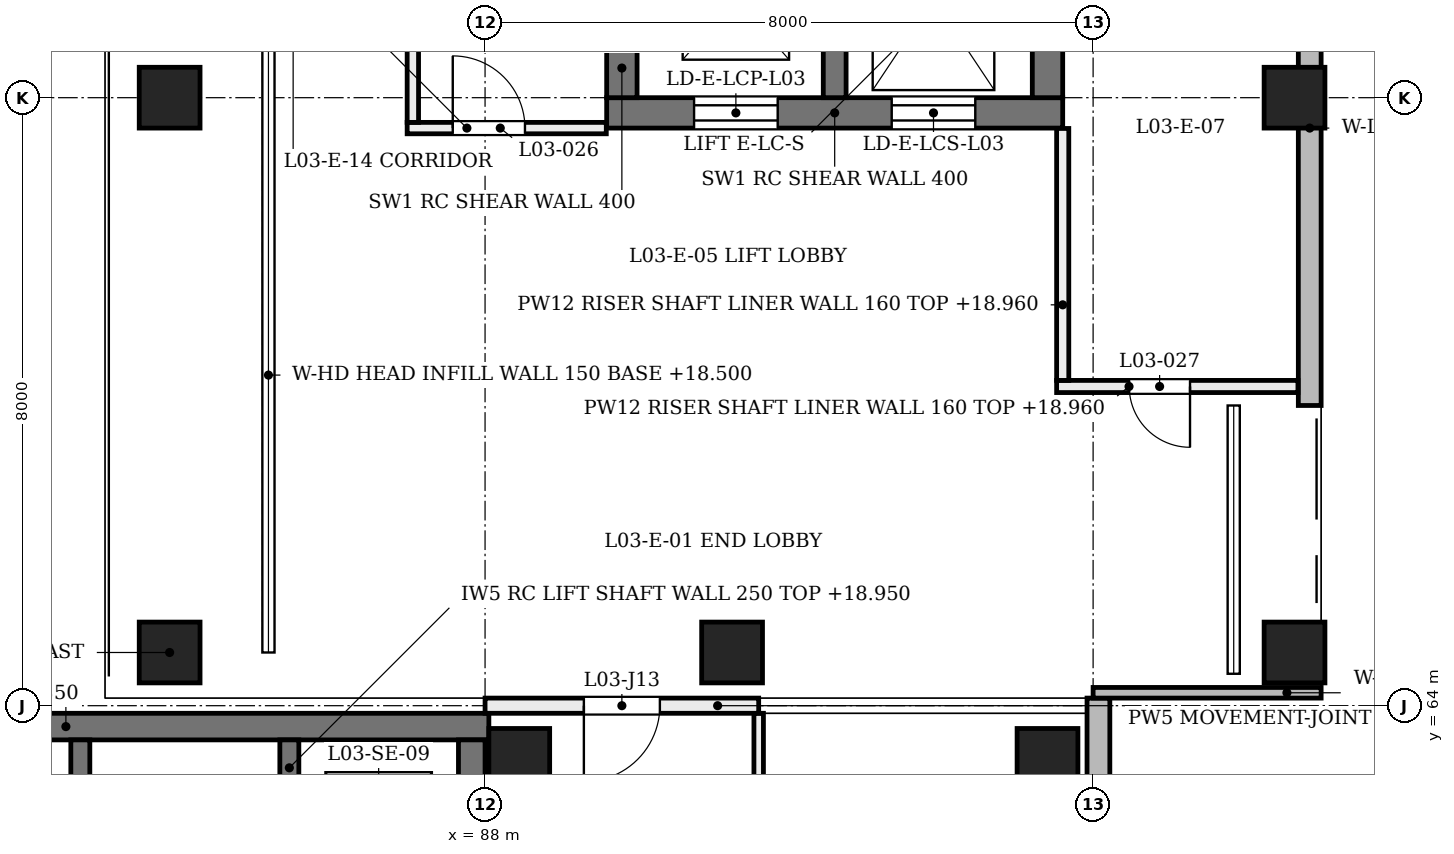
"""IFC4 building model, lengths in metres.
Left out: names, types, materials, properties, quantities, classifications, styles, units other than length and angle.
Written with IfcOpenShell. Run it as: python <this file> out.ifc"""

import sys

from ifc_helpers import new_model, si_unit, direction, frame, frame_2d, origin, origin_2d, place, context, subcontext, project, spatial, rectangle, extrude, element, fill, save


model = new_model("IFC4")
c1 = context("Model", 3, precision=1e-05, world=origin(), true_north=direction((0.0, 1.0)))
c2 = subcontext(c1, "Body", "Model", "MODEL_VIEW")
j1 = project(units=[si_unit("LENGTHUNIT", "METRE"), si_unit("PLANEANGLEUNIT", "RADIAN")], contexts=[c1])
p1 = place(None, origin())
s1 = spatial("IfcSite", under=j1, at=p1, CompositionType="ELEMENT")
p2 = place(p1, origin())
s2 = spatial("IfcBuilding", under=s1, at=p2, CompositionType="ELEMENT")
p3 = place(p2, frame((0.0, 0.0, 14.4)))
s3 = spatial("IfcBuildingStorey", under=s2, at=p3, CompositionType="ELEMENT", Elevation=14.4)
p4 = place(p3, frame((89.6, 71.8, 0.0), z_axis=(0.0, 0.0, 1.0), x_axis=(1.0, 0.0, 0.0)))
e1 = element("IfcWall", 1, at=p4, inside=s3, PredefinedType="SHEAR", context=c2, shape_type="SweptSolid", body=[
    extrude(rectangle(XDim=6.0, YDim=0.4, at=frame_2d((3.0, 0.0))), origin(), (0.0, 0.0, 1.0), 4.58),
])
p5 = place(p4, frame((1.15, 0.0, 0.0)))
e2 = element("IfcOpeningElement", 2, at=p5, cuts=e1, PredefinedType="OPENING", context=c2, shape_type="SweptSolid", body=[
    extrude(rectangle(XDim=1.1, YDim=2.1, at=frame_2d((0.55, 1.05))), frame((0.0, 0.21, 0.0), z_axis=(0.0, -1.0, 0.0), x_axis=(1.0, 0.0, 0.0)), (0.0, 0.0, 1.0), 0.42),
])
p6 = place(p4, frame((3.75, 0.0, 0.0)))
e3 = element("IfcOpeningElement", 3, at=p6, cuts=e1, PredefinedType="OPENING", context=c2, shape_type="SweptSolid", body=[
    extrude(rectangle(XDim=1.1, YDim=2.1, at=frame_2d((0.55, 1.05))), frame((0.0, 0.21, 0.0), z_axis=(0.0, -1.0, 0.0), x_axis=(1.0, 0.0, 0.0)), (0.0, 0.0, 1.0), 0.42),
])
for number, where, z_axis, x_axis in (
    (4, (89.8, 72.0, 0.0), (0.0, 0.0, 1.0), (0.0, 1.0, 0.0)),
    (5, (95.4, 72.0, 0.0), (0.0, 0.0, 1.0), (0.0, 1.0, 0.0)),
):
    element("IfcWall", number, at=place(p3, frame(where, z_axis=z_axis, x_axis=x_axis)), inside=s3, PredefinedType="SHEAR", context=c2, shape_type="SweptSolid", body=[
        extrude(rectangle(XDim=2.6, YDim=0.4, at=frame_2d((1.3, 0.0))), origin(), (0.0, 0.0, 1.0), 4.58),
    ])
p7 = place(p3, frame((92.6, 72.0, 0.0), z_axis=(0.0, 0.0, 1.0), x_axis=(0.0, 1.0, 0.0)))
e6 = element("IfcWall", 6, at=p7, inside=s3, PredefinedType="SHEAR", context=c2, shape_type="SweptSolid", body=[
    extrude(rectangle(XDim=2.6, YDim=0.3, at=frame_2d((1.3, 0.0))), origin(), (0.0, 0.0, 1.0), 4.58),
])
p8 = place(p3, frame((80.1, 63.725, 0.0), z_axis=(0.0, 0.0, 1.0), x_axis=(1.0, 0.0, 0.0)))
e7 = element("IfcWall", 7, at=p8, inside=s3, PredefinedType="SHEAR", context=c2, shape_type="SweptSolid", body=[
    extrude(rectangle(XDim=7.95, YDim=0.35, at=frame_2d((3.975, 0.0))), origin(), (0.0, 0.0, 1.0), 4.58),
])
p9 = place(p3, frame((87.825, 48.35, 0.0), z_axis=(0.0, 0.0, 1.0), x_axis=(0.0, 1.0, 0.0)))
e8 = element("IfcWall", 8, at=p9, inside=s3, PredefinedType="SHEAR", context=c2, shape_type="SweptSolid", body=[
    extrude(rectangle(XDim=15.2, YDim=0.35, at=frame_2d((7.6, 0.0))), origin(), (0.0, 0.0, 1.0), 4.58),
])
p10 = place(p9, frame((0.95, 0.0, 0.0)))
e9 = element("IfcOpeningElement", 9, at=p10, cuts=e8, PredefinedType="OPENING", context=c2, shape_type="SweptSolid", body=[
    extrude(rectangle(XDim=1.0, YDim=2.1, at=frame_2d((0.5, 1.05))), frame((0.0, 0.185, 0.0), z_axis=(0.0, -1.0, 0.0), x_axis=(1.0, 0.0, 0.0)), (0.0, 0.0, 1.0), 0.37),
])
p11 = place(p9, frame((10.6, 0.0, 0.0)))
e10 = element("IfcOpeningElement", 10, at=p11, cuts=e8, PredefinedType="OPENING", context=c2, shape_type="SweptSolid", body=[
    extrude(rectangle(XDim=1.4, YDim=2.1, at=frame_2d((0.7, 1.05))), frame((0.0, 0.185, 0.0), z_axis=(0.0, -1.0, 0.0), x_axis=(1.0, 0.0, 0.0)), (0.0, 0.0, 1.0), 0.37),
])
for number, where, z_axis, x_axis in (
    (11, (88.45, 63.3, 0.0), (0.0, 0.0, 1.0), (1.0, 0.0, 0.0)),
    (12, (95.4, 63.3, 0.0), (0.0, 0.0, 1.0), (1.0, 0.0, 0.0)),
):
    element("IfcColumn", number, at=place(p3, frame(where, z_axis=z_axis, x_axis=x_axis)), inside=s3, PredefinedType="COLUMN", context=c2, shape_type="SweptSolid", body=[
        extrude(rectangle(XDim=0.8, YDim=0.8, at=origin_2d()), origin(), (0.0, 0.0, 1.0), 4.8),
    ])
for number, where, z_axis, x_axis in (
    (13, (83.6, 64.7, 0.0), (0.204, 0.0, 0.979), (0.0, 1.0, 0.0)),
    (14, (83.6, 72.0, 0.0), (0.204, 0.0, 0.979), (0.0, 1.0, 0.0)),
    (15, (91.0, 64.7, 0.0), (0.204, 0.0, 0.979), (0.0, 1.0, 0.0)),
    (16, (98.4, 64.7, 0.0), (0.204, 0.0, 0.979), (0.0, 1.0, 0.0)),
    (17, (98.4, 72.0, 0.0), (0.204, 0.0, 0.979), (0.0, 1.0, 0.0)),
):
    element("IfcColumn", number, at=place(p3, frame(where, z_axis=z_axis, x_axis=x_axis)), inside=s3, PredefinedType="COLUMN", context=c2, shape_type="SweptSolid", body=[
        extrude(rectangle(XDim=0.8, YDim=0.8, at=origin_2d()), origin(), (0.0, 0.0, 1.0), 4.903),
    ])
p12 = place(p3, frame((98.85, 67.95, 0.0), z_axis=(0.0, 0.0, 1.0), x_axis=(0.0, 1.0, 0.0)))
e18 = element("IfcWall", 18, at=p12, inside=s3, PredefinedType="SOLIDWALL", context=c2, shape_type="SweptSolid", body=[
    extrude(rectangle(XDim=7.3, YDim=0.3, at=frame_2d((3.65, 0.0))), origin(), (0.0, 0.0, 1.0), 3.9),
])
p13 = place(p3, frame((85.15, 64.9, 4.1), z_axis=(0.0, 0.0, 1.0), x_axis=(0.0, 1.0, 0.0)))
e19 = element("IfcWall", 19, at=p13, inside=s3, PredefinedType="SOLIDWALL", context=c2, shape_type="SweptSolid", body=[
    extrude(rectangle(XDim=6.9, YDim=0.15, at=frame_2d((3.45, 0.0))), origin(), (0.0, 0.0, 1.0), 0.48),
])
p14 = place(p3, frame((85.15, 72.2, 4.1), z_axis=(0.0, 0.0, 1.0), x_axis=(0.0, 1.0, 0.0)))
e20 = element("IfcWall", 20, at=p14, inside=s3, PredefinedType="SOLIDWALL", context=c2, shape_type="SweptSolid", body=[
    extrude(rectangle(XDim=7.6, YDim=0.15, at=frame_2d((3.8, 0.0))), origin(), (0.0, 0.0, 1.0), 0.48),
])
p15 = place(p3, frame((96.07, 47.7, 0.0), z_axis=(0.0, 0.0, 1.0), x_axis=(0.0, 1.0, 0.0)))
e21 = element("IfcWall", 21, at=p15, inside=s3, PredefinedType="SOLIDWALL", context=c2, shape_type="SweptSolid", body=[
    extrude(rectangle(XDim=16.4, YDim=0.3, at=frame_2d((8.2, 0.0))), origin(), (0.0, 0.0, 1.0), 3.9),
])
p16 = place(p15, frame((0.9, 0.0, 0.75)))
e22 = element("IfcOpeningElement", 22, at=p16, cuts=e21, PredefinedType="OPENING", context=c2, shape_type="SweptSolid", body=[
    extrude(rectangle(XDim=0.9, YDim=3.1, at=frame_2d((0.45, 1.55))), frame((0.0, 0.16, 0.0), z_axis=(0.0, -1.0, 0.0), x_axis=(1.0, 0.0, 0.0)), (0.0, 0.0, 1.0), 0.32),
])
p17 = place(p15, frame((3.6, 0.0, 0.75)))
e23 = element("IfcOpeningElement", 23, at=p17, cuts=e21, PredefinedType="OPENING", context=c2, shape_type="SweptSolid", body=[
    extrude(rectangle(XDim=0.9, YDim=3.1, at=frame_2d((0.45, 1.55))), frame((0.0, 0.16, 0.0), z_axis=(0.0, -1.0, 0.0), x_axis=(1.0, 0.0, 0.0)), (0.0, 0.0, 1.0), 0.32),
])
p18 = place(p15, frame((6.3, 0.0, 0.75)))
e24 = element("IfcOpeningElement", 24, at=p18, cuts=e21, PredefinedType="OPENING", context=c2, shape_type="SweptSolid", body=[
    extrude(rectangle(XDim=0.9, YDim=3.1, at=frame_2d((0.45, 1.55))), frame((0.0, 0.16, 0.0), z_axis=(0.0, -1.0, 0.0), x_axis=(1.0, 0.0, 0.0)), (0.0, 0.0, 1.0), 0.32),
])
p19 = place(p15, frame((9.0, 0.0, 0.75)))
e25 = element("IfcOpeningElement", 25, at=p19, cuts=e21, PredefinedType="OPENING", context=c2, shape_type="SweptSolid", body=[
    extrude(rectangle(XDim=0.9, YDim=3.1, at=frame_2d((0.45, 1.55))), frame((0.0, 0.16, 0.0), z_axis=(0.0, -1.0, 0.0), x_axis=(1.0, 0.0, 0.0)), (0.0, 0.0, 1.0), 0.32),
])
p20 = place(p15, frame((11.7, 0.0, 0.75)))
e26 = element("IfcOpeningElement", 26, at=p20, cuts=e21, PredefinedType="OPENING", context=c2, shape_type="SweptSolid", body=[
    extrude(rectangle(XDim=0.9, YDim=3.1, at=frame_2d((0.45, 1.55))), frame((0.0, 0.16, 0.0), z_axis=(0.0, -1.0, 0.0), x_axis=(1.0, 0.0, 0.0)), (0.0, 0.0, 1.0), 0.32),
])
p21 = place(p15, frame((14.4, 0.0, 0.75)))
e27 = element("IfcOpeningElement", 27, at=p21, cuts=e21, PredefinedType="OPENING", context=c2, shape_type="SweptSolid", body=[
    extrude(rectangle(XDim=0.9, YDim=3.1, at=frame_2d((0.45, 1.55))), frame((0.0, 0.16, 0.0), z_axis=(0.0, -1.0, 0.0), x_axis=(1.0, 0.0, 0.0)), (0.0, 0.0, 1.0), 0.32),
])
p22 = place(p3, frame((96.0, 64.17, 0.0), z_axis=(0.0, 0.0, 1.0), x_axis=(1.0, 0.0, 0.0)))
e28 = element("IfcWall", 28, at=p22, inside=s3, PredefinedType="SOLIDWALL", context=c2, shape_type="SweptSolid", body=[
    extrude(rectangle(XDim=3.0, YDim=0.14, at=frame_2d((1.5, 0.0))), origin(), (0.0, 0.0, 1.0), 3.9),
])
for number, where, z_axis, x_axis in (
    (29, (85.425, 61.1, 0.0), (0.0, 0.0, 1.0), (0.0, 1.0, 0.0)),
    (30, (82.675, 61.1, 0.0), (0.0, 0.0, 1.0), (0.0, 1.0, 0.0)),
):
    element("IfcWall", number, at=place(p3, frame(where, z_axis=z_axis, x_axis=x_axis)), inside=s3, PredefinedType="SOLIDWALL", context=c2, shape_type="SweptSolid", body=[
        extrude(rectangle(XDim=2.45, YDim=0.25, at=frame_2d((1.225, 0.0))), origin(), (0.0, 0.0, 1.0), 4.55),
    ])
p23 = place(p3, frame((95.52, 68.2, 0.0), z_axis=(0.0, 0.0, 1.0), x_axis=(1.0, 0.0, 0.0)))
e31 = element("IfcWall", 31, at=p23, inside=s3, PredefinedType="PARTITIONING", context=c2, shape_type="SweptSolid", body=[
    extrude(rectangle(XDim=3.175, YDim=0.16, at=frame_2d((1.587, 0.0))), origin(), (0.0, 0.0, 1.0), 4.56),
])
p24 = place(p23, frame((0.955, 0.0, 0.0)))
e32 = element("IfcOpeningElement", 32, at=p24, cuts=e31, PredefinedType="OPENING", context=c2, shape_type="SweptSolid", body=[
    extrude(rectangle(XDim=0.8, YDim=2.1, at=frame_2d((0.4, 1.05))), frame((0.0, 0.09, 0.0), z_axis=(0.0, -1.0, 0.0), x_axis=(1.0, 0.0, 0.0)), (0.0, 0.0, 1.0), 0.18),
])
p25 = place(p3, frame((86.975, 71.6, 0.0), z_axis=(0.0, 0.0, 1.0), x_axis=(1.0, 0.0, 0.0)))
e33 = element("IfcWall", 33, at=p25, inside=s3, PredefinedType="PARTITIONING", context=c2, shape_type="SweptSolid", body=[
    extrude(rectangle(XDim=2.62, YDim=0.15, at=frame_2d((1.31, 0.0))), origin(), (0.0, 0.0, 1.0), 4.56),
])
p26 = place(p25, frame((0.6, 0.0, 0.0)))
e34 = element("IfcOpeningElement", 34, at=p26, cuts=e33, PredefinedType="OPENING", context=c2, shape_type="SweptSolid", body=[
    extrude(rectangle(XDim=0.95, YDim=2.1, at=frame_2d((0.475, 1.05))), frame((0.0, 0.085, 0.0), z_axis=(0.0, -1.0, 0.0), x_axis=(1.0, 0.0, 0.0)), (0.0, 0.0, 1.0), 0.17),
])
p27 = place(p3, frame((95.6, 68.28, 0.0), z_axis=(0.0, 0.0, 1.0), x_axis=(0.0, 1.0, 0.0)))
e35 = element("IfcWall", 35, at=p27, inside=s3, PredefinedType="PARTITIONING", context=c2, shape_type="SweptSolid", body=[
    extrude(rectangle(XDim=3.315, YDim=0.16, at=frame_2d((1.657, 0.0))), origin(), (0.0, 0.0, 1.0), 4.56),
])
p28 = place(p3, frame((87.05, 71.675, 0.0), z_axis=(0.0, 0.0, 1.0), x_axis=(0.0, 1.0, 0.0)))
e36 = element("IfcWall", 36, at=p28, inside=s3, PredefinedType="PARTITIONING", context=c2, shape_type="SweptSolid", body=[
    extrude(rectangle(XDim=3.725, YDim=0.15, at=frame_2d((1.862, 0.0))), origin(), (0.0, 0.0, 1.0), 3.98),
])
p29 = place(p3, frame((91.6, 53.272, 0.0), z_axis=(0.0, 0.0, 1.0), x_axis=(0.0, 1.0, 0.0)))
e37 = element("IfcWall", 37, at=p29, inside=s3, PredefinedType="PARTITIONING", context=c2, shape_type="SweptSolid", body=[
    extrude(rectangle(XDim=10.628, YDim=0.125, at=frame_2d((5.314, 0.0))), origin(), (0.0, 0.0, 1.0), 3.88),
])
p30 = place(p29, frame((1.912, 0.0, 0.0)))
e38 = element("IfcOpeningElement", 38, at=p30, cuts=e37, PredefinedType="OPENING", context=c2, shape_type="SweptSolid", body=[
    extrude(rectangle(XDim=1.0, YDim=2.1, at=frame_2d((0.5, 1.05))), frame((0.0, 0.073, 0.0), z_axis=(0.0, -1.0, 0.0), x_axis=(1.0, 0.0, 0.0)), (0.0, 0.0, 1.0), 0.145),
])
p31 = place(p29, frame((7.155, 0.0, 0.0)))
e39 = element("IfcOpeningElement", 39, at=p31, cuts=e37, PredefinedType="OPENING", context=c2, shape_type="SweptSolid", body=[
    extrude(rectangle(XDim=1.0, YDim=2.1, at=frame_2d((0.5, 1.05))), frame((0.0, 0.073, 0.0), z_axis=(0.0, -1.0, 0.0), x_axis=(1.0, 0.0, 0.0)), (0.0, 0.0, 1.0), 0.145),
])
p32 = place(p3, frame((88.0, 64.0, 0.0), z_axis=(0.0, 0.0, 1.0), x_axis=(1.0, 0.0, 0.0)))
e40 = element("IfcWall", 40, at=p32, inside=s3, PredefinedType="PARTITIONING", context=c2, shape_type="SweptSolid", body=[
    extrude(rectangle(XDim=3.6, YDim=0.2, at=frame_2d((1.8, 0.0))), origin(), (0.0, 0.0, 1.0), 3.88),
])
p33 = place(p32, frame((1.3, 0.0, 0.0)))
e41 = element("IfcOpeningElement", 41, at=p33, cuts=e40, PredefinedType="OPENING", context=c2, shape_type="SweptSolid", body=[
    extrude(rectangle(XDim=1.0, YDim=2.1, at=frame_2d((0.5, 1.05))), frame((0.0, 0.11, 0.0), z_axis=(0.0, -1.0, 0.0), x_axis=(1.0, 0.0, 0.0)), (0.0, 0.0, 1.0), 0.22),
])
p34 = place(p5, frame((1.1, 0.0, 0.0), z_axis=(0.0, 0.0, 1.0), x_axis=(-1.0, 0.0, 0.0)))
e42 = element("IfcDoor", 42, at=p34, inside=s3, OperationType="DOUBLE_DOOR_SLIDING", PredefinedType="DOOR", context=c2, shape_type="SweptSolid", body=[
    extrude(rectangle(XDim=1.1, YDim=2.1, at=frame_2d((0.55, 1.05))), frame((0.0, 0.025, 0.0), z_axis=(0.0, -1.0, 0.0), x_axis=(1.0, 0.0, 0.0)), (0.0, 0.0, 1.0), 0.05),
])
fill(e2, e42)
p35 = place(p6, frame((1.1, 0.0, 0.0), z_axis=(0.0, 0.0, 1.0), x_axis=(-1.0, 0.0, 0.0)))
e43 = element("IfcDoor", 43, at=p35, inside=s3, OperationType="DOUBLE_DOOR_SLIDING", PredefinedType="DOOR", context=c2, shape_type="SweptSolid", body=[
    extrude(rectangle(XDim=1.1, YDim=2.1, at=frame_2d((0.55, 1.05))), frame((0.0, 0.025, 0.0), z_axis=(0.0, -1.0, 0.0), x_axis=(1.0, 0.0, 0.0)), (0.0, 0.0, 1.0), 0.05),
])
fill(e3, e43)
p36 = place(p26, origin())
e44 = element("IfcDoor", 44, at=p36, inside=s3, OperationType="SINGLE_SWING_LEFT", PredefinedType="DOOR", context=c2, shape_type="SweptSolid", body=[
    extrude(rectangle(XDim=0.95, YDim=2.1, at=frame_2d((0.475, 1.05))), frame((0.0, 0.025, 0.0), z_axis=(0.0, -1.0, 0.0), x_axis=(1.0, 0.0, 0.0)), (0.0, 0.0, 1.0), 0.05),
])
fill(e34, e44)
p37 = place(p24, origin())
e45 = element("IfcDoor", 45, at=p37, inside=s3, OperationType="SINGLE_SWING_RIGHT", PredefinedType="DOOR", context=c2, shape_type="SweptSolid", body=[
    extrude(rectangle(XDim=0.8, YDim=2.1, at=frame_2d((0.4, 1.05))), frame((0.0, 0.025, 0.0), z_axis=(0.0, -1.0, 0.0), x_axis=(1.0, 0.0, 0.0)), (0.0, 0.0, 1.0), 0.05),
])
fill(e32, e45)
p38 = place(p33, frame((1.0, 0.0, 0.0), z_axis=(0.0, 0.0, 1.0), x_axis=(-1.0, 0.0, 0.0)))
e46 = element("IfcDoor", 46, at=p38, inside=s3, OperationType="SINGLE_SWING_LEFT", PredefinedType="DOOR", context=c2, shape_type="SweptSolid", body=[
    extrude(rectangle(XDim=1.0, YDim=2.1, at=frame_2d((0.5, 1.05))), frame((0.0, 0.025, 0.0), z_axis=(0.0, -1.0, 0.0), x_axis=(1.0, 0.0, 0.0)), (0.0, 0.0, 1.0), 0.05),
])
fill(e41, e46)
save(model, sys.argv[1])
